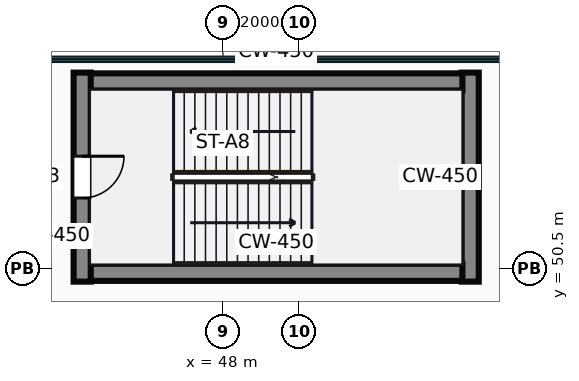
"""IFC4 building model, lengths in metres.
Left out: names, types, materials, properties, quantities, classifications, styles, units other than length and angle.
Written with IfcOpenShell. Run it as: python <this file> out.ifc"""

import sys

from ifc_helpers import new_model, si_unit, direction, frame, frame_2d, origin, place, context, subcontext, project, spatial, rectangle, extrude, source, transform, mapped, element, fill, save


model = new_model("IFC4")
c1 = context("Model", 3, precision=1e-05, world=origin(), true_north=direction((0.0, 1.0)))
c2 = subcontext(c1, "Body", "Model", "MODEL_VIEW")
j1 = project(units=[si_unit("LENGTHUNIT", "METRE"), si_unit("PLANEANGLEUNIT", "RADIAN")], contexts=[c1])
p1 = place(None, origin())
s1 = spatial("IfcSite", under=j1, at=p1, CompositionType="ELEMENT")
p2 = place(p1, origin())
s2 = spatial("IfcBuilding", under=s1, at=p2, CompositionType="ELEMENT")
p3 = place(p2, frame((0.0, 0.0, 6.0)))
s3 = spatial("IfcBuildingStorey", under=s2, at=p3, CompositionType="ELEMENT", Elevation=6.0)
m1 = source(origin(), c2, "Body", "SweptSolid", [
    extrude(rectangle(XDim=5.5, YDim=0.45, at=frame_2d((2.75, 0.0))), origin(), (0.0, 0.0, 1.0), 5.0),
])
p4 = place(p3, frame((44.295, 50.15, 0.0), z_axis=(0.0, 0.0, 1.0), x_axis=(0.0, 1.0, 0.0)))
e1 = element("IfcWall", 1, at=p4, inside=s3, PredefinedType="SHEAR", context=c2, shape_type="MappedRepresentation", body=[
    mapped(m1, transform((0.0, 0.0, 0.0))),
])
p5 = place(p4, frame((2.2, 0.0, 0.0)))
e2 = element("IfcOpeningElement", 2, at=p5, cuts=e1, PredefinedType="OPENING", context=c2, shape_type="SweptSolid", body=[
    extrude(rectangle(XDim=1.1, YDim=2.15, at=frame_2d((0.55, 1.075))), frame((0.0, 0.235, 0.0), z_axis=(0.0, -1.0, 0.0), x_axis=(1.0, 0.0, 0.0)), (0.0, 0.0, 1.0), 0.47),
])
m2 = source(origin(), c2, "Body", "SweptSolid", [
    extrude(rectangle(XDim=9.8, YDim=0.45, at=frame_2d((4.9, 0.0))), origin(), (0.0, 0.0, 1.0), 5.0),
])
for number, where, z_axis, x_axis in (
    (3, (44.5, 50.395, 0.0), (0.0, 0.0, 1.0), (1.0, 0.0, 0.0)),
    (4, (44.5, 55.405, 0.0), (0.0, 0.0, 1.0), (1.0, 0.0, 0.0)),
):
    element("IfcWall", number, at=place(p3, frame(where, z_axis=z_axis, x_axis=x_axis)), inside=s3, PredefinedType="SHEAR", context=c2, shape_type="MappedRepresentation", body=[
        mapped(m2, transform((0.0, 0.0, 0.0))),
    ])
p6 = place(p3, frame((54.505, 50.15, 0.0), z_axis=(0.0, 0.0, 1.0), x_axis=(0.0, 1.0, 0.0)))
e5 = element("IfcWall", 5, at=p6, inside=s3, PredefinedType="SHEAR", context=c2, shape_type="MappedRepresentation", body=[
    mapped(m1, transform((0.0, 0.0, 0.0))),
])
m3 = source(origin(), c2, "Body", "SweptSolid", [
    extrude(rectangle(XDim=1.1, YDim=2.15, at=frame_2d((0.55, 1.075))), frame((0.0, 0.025, 0.0), z_axis=(0.0, -1.0, 0.0), x_axis=(1.0, 0.0, 0.0)), (0.0, 0.0, 1.0), 0.05),
])
p7 = place(p5, frame((1.1, 0.0, 0.0), z_axis=(0.0, 0.0, 1.0), x_axis=(-1.0, 0.0, 0.0)))
e6 = element("IfcDoor", 6, at=p7, inside=s3, OperationType="SINGLE_SWING_RIGHT", PredefinedType="DOOR", context=c2, shape_type="MappedRepresentation", body=[
    mapped(m3, transform((0.0, 0.0, 0.0))),
])
fill(e2, e6)
save(model, sys.argv[1])
